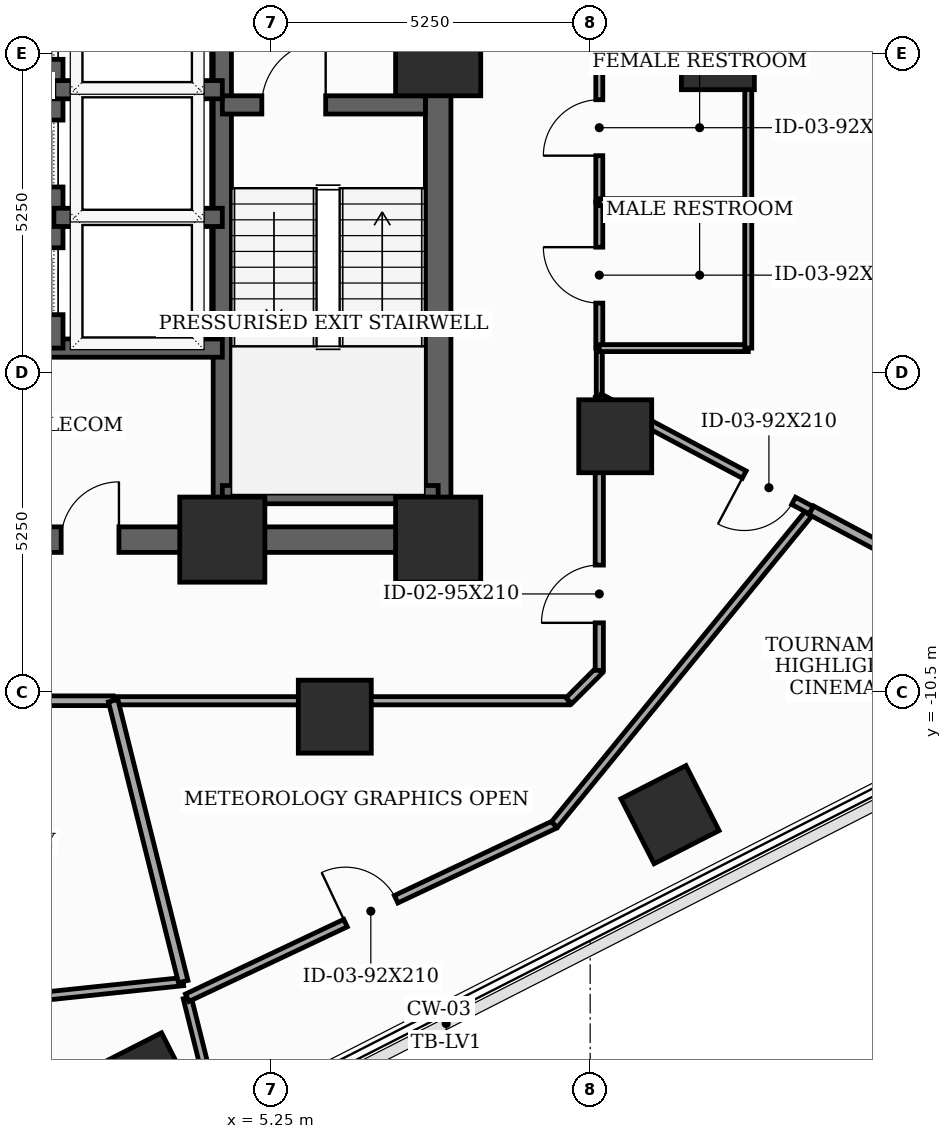
"""IFC4 building model, lengths in metres.
Left out: names, types, materials, properties, quantities, classifications, styles, units other than length and angle.
Written with IfcOpenShell. Run it as: python <this file> out.ifc"""

import sys

from ifc_helpers import new_model, si_unit, direction, frame, frame_2d, origin, origin_2d, place, context, subcontext, project, spatial, rectangle, extrude, element, fill, save


model = new_model("IFC4")
c1 = context("Model", 3, precision=1e-05, world=origin(), true_north=direction((0.0, 1.0)))
c2 = subcontext(c1, "Body", "Model", "MODEL_VIEW")
j1 = project(units=[si_unit("LENGTHUNIT", "METRE"), si_unit("PLANEANGLEUNIT", "RADIAN")], contexts=[c1])
p1 = place(None, origin())
s1 = spatial("IfcSite", under=j1, at=p1, CompositionType="ELEMENT")
p2 = place(p1, origin())
s2 = spatial("IfcBuilding", under=s1, at=p2, CompositionType="ELEMENT")
p3 = place(p2, frame((0.0, 0.0, 127.3)))
s3 = spatial("IfcBuildingStorey", under=s2, at=p3, CompositionType="ELEMENT", Elevation=127.3)
for number, where, z_axis, x_axis in (
    (1, (4.45, -8.0, 0.0), (0.0, 0.0, 1.0), (1.0, 0.0, 0.0)),
    (2, (8.0, -8.0, 0.0), (0.0, 0.0, 1.0), (1.0, 0.0, 0.0)),
    (3, (8.0, 0.0, 0.0), (0.0, 0.0, 1.0), (1.0, 0.0, 0.0)),
):
    element("IfcColumn", number, at=place(p3, frame(where, z_axis=z_axis, x_axis=x_axis)), inside=s3, PredefinedType="COLUMN", context=c2, shape_type="SweptSolid", body=[
        extrude(rectangle(XDim=1.4, YDim=1.4, at=origin_2d()), origin(), (0.0, 0.0, 1.0), 3.7),
    ])
for number, where, z_axis, x_axis in (
    (4, (12.6, 0.0, 0.0), (0.0, 0.0, 1.0), (1.0, 0.0, 0.0)),
    (5, (6.3, -10.912, 0.0), (0.0, 0.0, 1.0), (1.0, 0.0, 0.0)),
    (6, (10.912, -6.3, 0.0), (0.0, 0.0, 1.0), (1.0, 0.0, 0.0)),
    (7, (3.188, -16.918, 0.0), (0.0, 0.0, 1.0), (0.891, 0.454, 0.0)),
    (8, (11.813, -12.524, 0.0), (0.0, 0.0, 1.0), (0.891, 0.454, 0.0)),
):
    element("IfcColumn", number, at=place(p3, frame(where, z_axis=z_axis, x_axis=x_axis)), inside=s3, PredefinedType="COLUMN", context=c2, shape_type="SweptSolid", body=[
        extrude(rectangle(XDim=1.2, YDim=1.2, at=origin_2d()), origin(), (0.0, 0.0, 1.0), 3.7),
    ])
p4 = place(p3, frame((8.0, -8.0, 0.0), z_axis=(0.0, 0.0, 1.0), x_axis=(0.0, 1.0, 0.0)))
e9 = element("IfcWall", 9, at=p4, inside=s3, PredefinedType="SHEAR", context=c2, shape_type="SweptSolid", body=[
    extrude(rectangle(XDim=16.0, YDim=0.42, at=frame_2d((8.0, 0.0))), origin(), (0.0, 0.0, 1.0), 3.5),
])
p5 = place(p4, frame((9.6, 0.0, 0.0)))
e10 = element("IfcOpeningElement", 10, at=p5, cuts=e9, PredefinedType="OPENING", context=c2, shape_type="SweptSolid", body=[
    extrude(rectangle(XDim=1.05, YDim=2.15, at=frame_2d((0.525, 1.075))), frame((0.0, 0.22, 0.0), z_axis=(0.0, -1.0, 0.0), x_axis=(1.0, 0.0, 0.0)), (0.0, 0.0, 1.0), 0.44),
])
p6 = place(p4, frame((14.229, 0.0, 0.0)))
e11 = element("IfcOpeningElement", 11, at=p6, cuts=e9, PredefinedType="OPENING", context=c2, shape_type="SweptSolid", body=[
    extrude(rectangle(XDim=0.85, YDim=2.02, at=frame_2d((0.425, 1.01))), frame((0.0, 0.22, 0.0), z_axis=(0.0, -1.0, 0.0), x_axis=(1.0, 0.0, 0.0)), (0.0, 0.0, 1.0), 0.44),
])
p7 = place(p3, frame((-8.0, -8.0, 0.0), z_axis=(0.0, 0.0, 1.0), x_axis=(1.0, 0.0, 0.0)))
e12 = element("IfcWall", 12, at=p7, inside=s3, PredefinedType="SHEAR", context=c2, shape_type="SweptSolid", body=[
    extrude(rectangle(XDim=16.0, YDim=0.42, at=frame_2d((8.0, 0.0))), origin(), (0.0, 0.0, 1.0), 3.5),
])
p8 = place(p7, frame((5.2, 0.0, 0.0)))
e13 = element("IfcOpeningElement", 13, at=p8, cuts=e12, PredefinedType="OPENING", context=c2, shape_type="SweptSolid", body=[
    extrude(rectangle(XDim=0.95, YDim=2.1, at=frame_2d((0.475, 1.05))), frame((0.0, 0.22, 0.0), z_axis=(0.0, -1.0, 0.0), x_axis=(1.0, 0.0, 0.0)), (0.0, 0.0, 1.0), 0.44),
])
p9 = place(p7, frame((9.8, 0.0, 0.0)))
e14 = element("IfcOpeningElement", 14, at=p9, cuts=e12, PredefinedType="OPENING", context=c2, shape_type="SweptSolid", body=[
    extrude(rectangle(XDim=0.95, YDim=2.1, at=frame_2d((0.475, 1.05))), frame((0.0, 0.22, 0.0), z_axis=(0.0, -1.0, 0.0), x_axis=(1.0, 0.0, 0.0)), (0.0, 0.0, 1.0), 0.44),
])
p10 = place(p3, frame((4.45, -7.79, 0.0), z_axis=(0.0, 0.0, 1.0), x_axis=(0.0, 1.0, 0.0)))
e15 = element("IfcWall", 15, at=p10, inside=s3, PredefinedType="SHEAR", context=c2, shape_type="SweptSolid", body=[
    extrude(rectangle(XDim=15.58, YDim=0.3, at=frame_2d((7.79, 0.0))), origin(), (0.0, 0.0, 1.0), 3.5),
])
p11 = place(p3, frame((4.45, -0.85, 0.0), z_axis=(0.0, 0.0, 1.0), x_axis=(1.0, 0.0, 0.0)))
e16 = element("IfcWall", 16, at=p11, inside=s3, PredefinedType="SHEAR", context=c2, shape_type="SweptSolid", body=[
    extrude(rectangle(XDim=3.34, YDim=0.3, at=frame_2d((1.67, 0.0))), origin(), (0.0, 0.0, 1.0), 3.5),
])
p12 = place(p11, frame((0.65, 0.0, 0.0)))
e17 = element("IfcOpeningElement", 17, at=p12, cuts=e16, PredefinedType="OPENING", context=c2, shape_type="SweptSolid", body=[
    extrude(rectangle(XDim=1.05, YDim=2.15, at=frame_2d((0.525, 1.075))), frame((0.0, 0.16, 0.0), z_axis=(0.0, -1.0, 0.0), x_axis=(1.0, 0.0, 0.0)), (0.0, 0.0, 1.0), 0.32),
])
p13 = place(p3, frame((4.45, -7.26, 0.0), z_axis=(0.0, 0.0, 1.0), x_axis=(1.0, 0.0, 0.0)))
e18 = element("IfcWall", 18, at=p13, inside=s3, PredefinedType="SHEAR", context=c2, shape_type="SweptSolid", body=[
    extrude(rectangle(XDim=3.55, YDim=0.3, at=frame_2d((1.775, 0.0))), origin(), (0.0, 0.0, 1.0), 3.5),
])
p14 = place(p3, frame((-4.45, -4.85, 0.0), z_axis=(0.0, 0.0, 1.0), x_axis=(1.0, 0.0, 0.0)))
e19 = element("IfcWall", 19, at=p14, inside=s3, PredefinedType="SHEAR", context=c2, shape_type="SweptSolid", body=[
    extrude(rectangle(XDim=8.9, YDim=0.3, at=frame_2d((4.45, 0.0))), origin(), (0.0, 0.0, 1.0), 3.5),
])
p15 = place(p3, frame((1.68, -4.85, 0.0), z_axis=(0.0, 0.0, 1.0), x_axis=(0.0, 1.0, 0.0)))
e20 = element("IfcWall", 20, at=p15, inside=s3, PredefinedType="SHEAR", context=c2, shape_type="SweptSolid", body=[
    extrude(rectangle(XDim=12.64, YDim=0.3, at=frame_2d((6.32, 0.0))), origin(), (0.0, 0.0, 1.0), 3.5),
])
p16 = place(p15, frame((0.55, 0.0, 0.0)))
e21 = element("IfcOpeningElement", 21, at=p16, cuts=e20, PredefinedType="OPENING", context=c2, shape_type="SweptSolid", body=[
    extrude(rectangle(XDim=1.1, YDim=2.1, at=frame_2d((0.55, 1.05))), frame((0.0, 0.16, 0.0), z_axis=(0.0, -1.0, 0.0), x_axis=(1.0, 0.0, 0.0)), (0.0, 0.0, 1.0), 0.32),
])
p17 = place(p15, frame((2.65, 0.0, 0.0)))
e22 = element("IfcOpeningElement", 22, at=p17, cuts=e20, PredefinedType="OPENING", context=c2, shape_type="SweptSolid", body=[
    extrude(rectangle(XDim=1.1, YDim=2.1, at=frame_2d((0.55, 1.05))), frame((0.0, 0.16, 0.0), z_axis=(0.0, -1.0, 0.0), x_axis=(1.0, 0.0, 0.0)), (0.0, 0.0, 1.0), 0.32),
])
p18 = place(p15, frame((4.75, 0.0, 0.0)))
e23 = element("IfcOpeningElement", 23, at=p18, cuts=e20, PredefinedType="OPENING", context=c2, shape_type="SweptSolid", body=[
    extrude(rectangle(XDim=1.1, YDim=2.1, at=frame_2d((0.55, 1.05))), frame((0.0, 0.16, 0.0), z_axis=(0.0, -1.0, 0.0), x_axis=(1.0, 0.0, 0.0)), (0.0, 0.0, 1.0), 0.32),
])
p19 = place(p15, frame((6.85, 0.0, 0.0)))
e24 = element("IfcOpeningElement", 24, at=p19, cuts=e20, PredefinedType="OPENING", context=c2, shape_type="SweptSolid", body=[
    extrude(rectangle(XDim=1.1, YDim=2.1, at=frame_2d((0.55, 1.05))), frame((0.0, 0.16, 0.0), z_axis=(0.0, -1.0, 0.0), x_axis=(1.0, 0.0, 0.0)), (0.0, 0.0, 1.0), 0.32),
])
p20 = place(p15, frame((8.95, 0.0, 0.0)))
e25 = element("IfcOpeningElement", 25, at=p20, cuts=e20, PredefinedType="OPENING", context=c2, shape_type="SweptSolid", body=[
    extrude(rectangle(XDim=1.1, YDim=2.1, at=frame_2d((0.55, 1.05))), frame((0.0, 0.16, 0.0), z_axis=(0.0, -1.0, 0.0), x_axis=(1.0, 0.0, 0.0)), (0.0, 0.0, 1.0), 0.32),
])
p21 = place(p15, frame((11.05, 0.0, 0.0)))
e26 = element("IfcOpeningElement", 26, at=p21, cuts=e20, PredefinedType="OPENING", context=c2, shape_type="SweptSolid", body=[
    extrude(rectangle(XDim=1.1, YDim=2.1, at=frame_2d((0.55, 1.05))), frame((0.0, 0.16, 0.0), z_axis=(0.0, -1.0, 0.0), x_axis=(1.0, 0.0, 0.0)), (0.0, 0.0, 1.0), 0.32),
])
for number, where, z_axis, x_axis in (
    (27, (1.68, -2.7, 0.0), (0.0, 0.0, 1.0), (1.0, 0.0, 0.0)),
    (28, (1.68, -0.6, 0.0), (0.0, 0.0, 1.0), (1.0, 0.0, 0.0)),
):
    element("IfcWall", number, at=place(p3, frame(where, z_axis=z_axis, x_axis=x_axis)), inside=s3, PredefinedType="SHEAR", context=c2, shape_type="SweptSolid", body=[
        extrude(rectangle(XDim=2.77, YDim=0.3, at=frame_2d((1.385, 0.0))), origin(), (0.0, 0.0, 1.0), 3.5),
    ])
p22 = place(p3, frame((-8.936, -10.65, 0.0), z_axis=(0.0, 0.0, 1.0), x_axis=(1.0, 0.0, 0.0)))
e29 = element("IfcWall", 29, at=p22, inside=s3, PredefinedType="PARTITIONING", context=c2, shape_type="SweptSolid", body=[
    extrude(rectangle(XDim=11.591, YDim=0.16, at=frame_2d((5.795, 0.0))), origin(), (0.0, 0.0, 1.0), 2.785),
])
p23 = place(p22, frame((5.295, 0.0, 0.0)))
e30 = element("IfcOpeningElement", 30, at=p23, cuts=e29, PredefinedType="OPENING", context=c2, shape_type="SweptSolid", body=[
    extrude(rectangle(XDim=1.0, YDim=2.15, at=frame_2d((0.5, 1.075))), frame((0.0, 0.09, 0.0), z_axis=(0.0, -1.0, 0.0), x_axis=(1.0, 0.0, 0.0)), (0.0, 0.0, 1.0), 0.18),
])
p24 = place(p3, frame((2.655, -10.65, 0.0), z_axis=(0.0, 0.0, 1.0), x_axis=(1.0, 0.0, 0.0)))
e31 = element("IfcWall", 31, at=p24, inside=s3, PredefinedType="PARTITIONING", context=c2, shape_type="SweptSolid", body=[
    extrude(rectangle(XDim=7.495, YDim=0.135, at=frame_2d((3.748, 0.0))), origin(), (0.0, 0.0, 1.0), 2.785),
])
p25 = place(p3, frame((10.15, -10.65, 0.0), z_axis=(0.0, 0.0, 1.0), x_axis=(0.707106781187, 0.707106781187, 0.0)))
e32 = element("IfcWall", 32, at=p25, inside=s3, PredefinedType="PARTITIONING", context=c2, shape_type="SweptSolid", body=[
    extrude(rectangle(XDim=0.707, YDim=0.135, at=frame_2d((0.354, 0.0))), origin(), (0.0, 0.0, 1.0), 3.5),
])
p26 = place(p3, frame((10.65, -10.15, 0.0), z_axis=(0.0, 0.0, 1.0), x_axis=(0.0, 1.0, 0.0)))
e33 = element("IfcWall", 33, at=p26, inside=s3, PredefinedType="PARTITIONING", context=c2, shape_type="SweptSolid", body=[
    extrude(rectangle(XDim=4.487, YDim=0.135, at=frame_2d((2.243, 0.0))), origin(), (0.0, 0.0, 1.0), 2.785),
])
p27 = place(p26, frame((0.781, 0.0, 0.0)))
e34 = element("IfcOpeningElement", 34, at=p27, cuts=e33, PredefinedType="OPENING", context=c2, shape_type="SweptSolid", body=[
    extrude(rectangle(XDim=0.95, YDim=2.1, at=frame_2d((0.475, 1.05))), frame((0.0, 0.077, 0.0), z_axis=(0.0, -1.0, 0.0), x_axis=(1.0, 0.0, 0.0)), (0.0, 0.0, 1.0), 0.155),
])
p28 = place(p3, frame((10.65, -4.85, 0.0), z_axis=(0.0, 0.0, 1.0), x_axis=(0.0, 1.0, 0.0)))
e35 = element("IfcWall", 35, at=p28, inside=s3, PredefinedType="PARTITIONING", context=c2, shape_type="SweptSolid", body=[
    extrude(rectangle(XDim=2.4, YDim=0.115, at=frame_2d((1.2, 0.0))), origin(), (0.0, 0.0, 1.0), 3.5),
])
p29 = place(p28, frame((0.74, 0.0, 0.0)))
e36 = element("IfcOpeningElement", 36, at=p29, cuts=e35, PredefinedType="OPENING", context=c2, shape_type="SweptSolid", body=[
    extrude(rectangle(XDim=0.92, YDim=2.1, at=frame_2d((0.46, 1.05))), frame((0.0, 0.067, 0.0), z_axis=(0.0, -1.0, 0.0), x_axis=(1.0, 0.0, 0.0)), (0.0, 0.0, 1.0), 0.135),
])
p30 = place(p3, frame((10.65, -2.45, 0.0), z_axis=(0.0, 0.0, 1.0), x_axis=(0.0, 1.0, 0.0)))
e37 = element("IfcWall", 37, at=p30, inside=s3, PredefinedType="PARTITIONING", context=c2, shape_type="SweptSolid", body=[
    extrude(rectangle(XDim=2.45, YDim=0.115, at=frame_2d((1.225, 0.0))), origin(), (0.0, 0.0, 1.0), 2.785),
])
p31 = place(p30, frame((0.765, 0.0, 0.0)))
e38 = element("IfcOpeningElement", 38, at=p31, cuts=e37, PredefinedType="OPENING", context=c2, shape_type="SweptSolid", body=[
    extrude(rectangle(XDim=0.92, YDim=2.1, at=frame_2d((0.46, 1.05))), frame((0.0, 0.067, 0.0), z_axis=(0.0, -1.0, 0.0), x_axis=(1.0, 0.0, 0.0)), (0.0, 0.0, 1.0), 0.135),
])
p32 = place(p3, frame((10.65, -5.663, 0.0), z_axis=(0.0, 0.0, 1.0), x_axis=(0.0, 1.0, 0.0)))
e39 = element("IfcWall", 39, at=p32, inside=s3, PredefinedType="MOVABLE", context=c2, shape_type="SweptSolid", body=[
    extrude(rectangle(XDim=0.813, YDim=0.1, at=frame_2d((0.406, 0.0))), origin(), (0.0, 0.0, 1.0), 3.5),
])
p33 = place(p3, frame((10.65, 0.0, 0.0), z_axis=(0.0, 0.0, 1.0), x_axis=(0.0, 1.0, 0.0)))
e40 = element("IfcWall", 40, at=p33, inside=s3, PredefinedType="PARTITIONING", context=c2, shape_type="SweptSolid", body=[
    extrude(rectangle(XDim=2.45, YDim=0.115, at=frame_2d((1.225, 0.0))), origin(), (0.0, 0.0, 1.0), 2.785),
])
p34 = place(p33, frame((0.765, 0.0, 0.0)))
e41 = element("IfcOpeningElement", 41, at=p34, cuts=e40, PredefinedType="OPENING", context=c2, shape_type="SweptSolid", body=[
    extrude(rectangle(XDim=0.92, YDim=2.1, at=frame_2d((0.46, 1.05))), frame((0.0, 0.067, 0.0), z_axis=(0.0, -1.0, 0.0), x_axis=(1.0, 0.0, 0.0)), (0.0, 0.0, 1.0), 0.135),
])
p35 = place(p3, frame((3.807, -15.269, 0.0), z_axis=(0.0, 0.0, 1.0), x_axis=(-0.994513256503, -0.104610623932, 0.0)))
e42 = element("IfcWall", 42, at=p35, inside=s3, PredefinedType="PARTITIONING", context=c2, shape_type="SweptSolid", body=[
    extrude(rectangle(XDim=4.798, YDim=0.135, at=frame_2d((2.399, 0.0))), origin(), (0.0, 0.0, 1.0), 2.875),
])
p36 = place(p3, frame((4.393, -17.618, 0.0), z_axis=(0.0, 0.0, 1.0), x_axis=(-0.242107483306, 0.970249435211, 0.0)))
e43 = element("IfcWall", 43, at=p36, inside=s3, PredefinedType="PARTITIONING", context=c2, shape_type="SweptSolid", body=[
    extrude(rectangle(XDim=2.147, YDim=0.135, at=frame_2d((1.073, 0.0))), origin(), (0.0, 0.0, 1.0), 2.975),
])
p37 = place(p3, frame((3.807, -15.269, 0.0), z_axis=(0.0, 0.0, 1.0), x_axis=(-0.241956377954, 0.970287128209, 0.0)))
e44 = element("IfcWall", 44, at=p37, inside=s3, PredefinedType="PARTITIONING", context=c2, shape_type="SweptSolid", body=[
    extrude(rectangle(XDim=4.76, YDim=0.16, at=frame_2d((2.38, 0.0))), origin(), (0.0, 0.0, 1.0), 2.785),
])
p38 = place(p3, frame((3.873, -15.535, 0.0), z_axis=(0.0, 0.0, 1.0), x_axis=(0.904472849066, 0.426531200855, 0.0)))
e45 = element("IfcWall", 45, at=p38, inside=s3, PredefinedType="PARTITIONING", context=c2, shape_type="SweptSolid", body=[
    extrude(rectangle(XDim=6.677, YDim=0.135, at=frame_2d((3.338, 0.0))), origin(), (0.0, 0.0, 1.0), 3.49),
])
p39 = place(p38, frame((2.878, 0.0, 0.0)))
e46 = element("IfcOpeningElement", 46, at=p39, cuts=e45, PredefinedType="OPENING", context=c2, shape_type="SweptSolid", body=[
    extrude(rectangle(XDim=0.92, YDim=2.1, at=frame_2d((0.46, 1.05))), frame((0.0, 0.077, 0.0), z_axis=(0.0, -1.0, 0.0), x_axis=(1.0, 0.0, 0.0)), (0.0, 0.0, 1.0), 0.155),
])
p40 = place(p3, frame((9.912, -12.687, 0.0), z_axis=(0.0, 0.0, 1.0), x_axis=(0.632781686385, 0.774330250846, 0.0)))
e47 = element("IfcWall", 47, at=p40, inside=s3, PredefinedType="PARTITIONING", context=c2, shape_type="SweptSolid", body=[
    extrude(rectangle(XDim=6.677, YDim=0.135, at=frame_2d((3.338, 0.0))), origin(), (0.0, 0.0, 1.0), 2.885),
])
p41 = place(p3, frame((14.137, -7.517, 0.0), z_axis=(0.0, 0.0, 1.0), x_axis=(-0.882957991608, 0.46945200506, 0.0)))
e48 = element("IfcWall", 48, at=p41, inside=s3, PredefinedType="PARTITIONING", context=c2, shape_type="SweptSolid", body=[
    extrude(rectangle(XDim=3.949, YDim=0.135, at=frame_2d((1.975, 0.0))), origin(), (0.0, 0.0, 1.0), 2.785),
])
p42 = place(p41, frame((0.33, 0.0, 0.0)))
e49 = element("IfcOpeningElement", 49, at=p42, cuts=e48, PredefinedType="OPENING", context=c2, shape_type="SweptSolid", body=[
    extrude(rectangle(XDim=0.92, YDim=2.1, at=frame_2d((0.46, 1.05))), frame((0.0, 0.077, 0.0), z_axis=(0.0, -1.0, 0.0), x_axis=(1.0, 0.0, 0.0)), (0.0, 0.0, 1.0), 0.155),
])
p43 = place(p3, frame((19.07, -10.14, 0.0), z_axis=(0.0, 0.0, 1.0), x_axis=(-0.882959500857, 0.469449166413, 0.0)))
e50 = element("IfcWall", 50, at=p43, inside=s3, PredefinedType="PARTITIONING", context=c2, shape_type="SweptSolid", body=[
    extrude(rectangle(XDim=5.586, YDim=0.16, at=frame_2d((2.793, 0.0))), origin(), (0.0, 0.0, 1.0), 2.985),
])
for number, where, z_axis, x_axis in (
    (51, (13.1, -2.45, 0.0), (0.0, 0.0, 1.0), (-1.0, 0.0, 0.0)),
    (52, (10.65, -4.85, 0.0), (0.0, 0.0, 1.0), (1.0, 0.0, 0.0)),
):
    element("IfcWall", number, at=place(p3, frame(where, z_axis=z_axis, x_axis=x_axis)), inside=s3, PredefinedType="PARTITIONING", context=c2, shape_type="SweptSolid", body=[
        extrude(rectangle(XDim=2.45, YDim=0.115, at=frame_2d((1.225, 0.0))), origin(), (0.0, 0.0, 1.0), 2.785),
    ])
p44 = place(p3, frame((13.1, -4.85, 0.0), z_axis=(0.0, 0.0, 1.0), x_axis=(0.0, 1.0, 0.0)))
e53 = element("IfcWall", 53, at=p44, inside=s3, PredefinedType="PARTITIONING", context=c2, shape_type="SweptSolid", body=[
    extrude(rectangle(XDim=2.4, YDim=0.115, at=frame_2d((1.2, 0.0))), origin(), (0.0, 0.0, 1.0), 3.5),
])
p45 = place(p3, frame((13.1, -2.45, 0.0), z_axis=(0.0, 0.0, 1.0), x_axis=(0.0, 1.0, 0.0)))
e54 = element("IfcWall", 54, at=p45, inside=s3, PredefinedType="PARTITIONING", context=c2, shape_type="SweptSolid", body=[
    extrude(rectangle(XDim=2.45, YDim=0.115, at=frame_2d((1.225, 0.0))), origin(), (0.0, 0.0, 1.0), 3.5),
])
p46 = place(p3, frame((13.1, 0.0, 0.0), z_axis=(0.0, 0.0, 1.0), x_axis=(-1.0, 0.0, 0.0)))
e55 = element("IfcWall", 55, at=p46, inside=s3, PredefinedType="PARTITIONING", context=c2, shape_type="SweptSolid", body=[
    extrude(rectangle(XDim=2.45, YDim=0.115, at=frame_2d((1.225, 0.0))), origin(), (0.0, 0.0, 1.0), 2.785),
])
p47 = place(p3, frame((13.1, 2.45, 0.0), z_axis=(0.0, 0.0, 1.0), x_axis=(0.0, -1.0, 0.0)))
e56 = element("IfcWall", 56, at=p47, inside=s3, PredefinedType="MOVABLE", context=c2, shape_type="SweptSolid", body=[
    extrude(rectangle(XDim=2.45, YDim=0.1, at=frame_2d((1.225, 0.0))), origin(), (0.0, 0.0, 1.0), 3.5),
])
p48 = place(p9, origin())
e57 = element("IfcDoor", 57, at=p48, inside=s3, OperationType="SINGLE_SWING_RIGHT", PredefinedType="DOOR", context=c2, shape_type="SweptSolid", body=[
    extrude(rectangle(XDim=0.95, YDim=2.1, at=frame_2d((0.475, 1.05))), frame((0.0, 0.025, 0.0), z_axis=(0.0, -1.0, 0.0), x_axis=(1.0, 0.0, 0.0)), (0.0, 0.0, 1.0), 0.05),
])
fill(e14, e57)
p49 = place(p12, origin())
e58 = element("IfcDoor", 58, at=p49, inside=s3, OperationType="SINGLE_SWING_RIGHT", PredefinedType="DOOR", context=c2, shape_type="SweptSolid", body=[
    extrude(rectangle(XDim=1.05, YDim=2.15, at=frame_2d((0.525, 1.075))), frame((0.0, 0.025, 0.0), z_axis=(0.0, -1.0, 0.0), x_axis=(1.0, 0.0, 0.0)), (0.0, 0.0, 1.0), 0.05),
])
fill(e17, e58)
p50 = place(p16, origin())
e59 = element("IfcDoor", 59, at=p50, inside=s3, OperationType="SLIDING_TO_LEFT", PredefinedType="DOOR", context=c2, shape_type="SweptSolid", body=[
    extrude(rectangle(XDim=1.1, YDim=2.1, at=frame_2d((0.55, 1.05))), frame((0.0, 0.025, 0.0), z_axis=(0.0, -1.0, 0.0), x_axis=(1.0, 0.0, 0.0)), (0.0, 0.0, 1.0), 0.05),
])
fill(e21, e59)
p51 = place(p17, origin())
e60 = element("IfcDoor", 60, at=p51, inside=s3, OperationType="SLIDING_TO_LEFT", PredefinedType="DOOR", context=c2, shape_type="SweptSolid", body=[
    extrude(rectangle(XDim=1.1, YDim=2.1, at=frame_2d((0.55, 1.05))), frame((0.0, 0.025, 0.0), z_axis=(0.0, -1.0, 0.0), x_axis=(1.0, 0.0, 0.0)), (0.0, 0.0, 1.0), 0.05),
])
fill(e22, e60)
p52 = place(p18, origin())
e61 = element("IfcDoor", 61, at=p52, inside=s3, OperationType="SLIDING_TO_LEFT", PredefinedType="DOOR", context=c2, shape_type="SweptSolid", body=[
    extrude(rectangle(XDim=1.1, YDim=2.1, at=frame_2d((0.55, 1.05))), frame((0.0, 0.025, 0.0), z_axis=(0.0, -1.0, 0.0), x_axis=(1.0, 0.0, 0.0)), (0.0, 0.0, 1.0), 0.05),
])
fill(e23, e61)
p53 = place(p27, origin())
e62 = element("IfcDoor", 62, at=p53, inside=s3, OperationType="SINGLE_SWING_LEFT", PredefinedType="DOOR", context=c2, shape_type="SweptSolid", body=[
    extrude(rectangle(XDim=0.95, YDim=2.1, at=frame_2d((0.475, 1.05))), frame((0.0, 0.025, 0.0), z_axis=(0.0, -1.0, 0.0), x_axis=(1.0, 0.0, 0.0)), (0.0, 0.0, 1.0), 0.05),
])
fill(e34, e62)
p54 = place(p29, origin())
e63 = element("IfcDoor", 63, at=p54, inside=s3, OperationType="SINGLE_SWING_RIGHT", PredefinedType="DOOR", context=c2, shape_type="SweptSolid", body=[
    extrude(rectangle(XDim=0.92, YDim=2.1, at=frame_2d((0.46, 1.05))), frame((0.0, 0.025, 0.0), z_axis=(0.0, -1.0, 0.0), x_axis=(1.0, 0.0, 0.0)), (0.0, 0.0, 1.0), 0.05),
])
fill(e36, e63)
p55 = place(p31, origin())
e64 = element("IfcDoor", 64, at=p55, inside=s3, OperationType="SINGLE_SWING_LEFT", PredefinedType="DOOR", context=c2, shape_type="SweptSolid", body=[
    extrude(rectangle(XDim=0.92, YDim=2.1, at=frame_2d((0.46, 1.05))), frame((0.0, 0.025, 0.0), z_axis=(0.0, -1.0, 0.0), x_axis=(1.0, 0.0, 0.0)), (0.0, 0.0, 1.0), 0.05),
])
fill(e38, e64)
p56 = place(p39, origin())
e65 = element("IfcDoor", 65, at=p56, inside=s3, OperationType="SINGLE_SWING_LEFT", PredefinedType="DOOR", context=c2, shape_type="SweptSolid", body=[
    extrude(rectangle(XDim=0.92, YDim=2.1, at=frame_2d((0.46, 1.05))), frame((0.0, 0.025, 0.0), z_axis=(0.0, -1.0, 0.0), x_axis=(1.0, 0.0, 0.0)), (0.0, 0.0, 1.0), 0.05),
])
fill(e46, e65)
p57 = place(p42, origin())
e66 = element("IfcDoor", 66, at=p57, inside=s3, OperationType="SINGLE_SWING_RIGHT", PredefinedType="DOOR", context=c2, shape_type="SweptSolid", body=[
    extrude(rectangle(XDim=0.92, YDim=2.1, at=frame_2d((0.46, 1.05))), frame((0.0, 0.025, 0.0), z_axis=(0.0, -1.0, 0.0), x_axis=(1.0, 0.0, 0.0)), (0.0, 0.0, 1.0), 0.05),
])
fill(e49, e66)
save(model, sys.argv[1])
